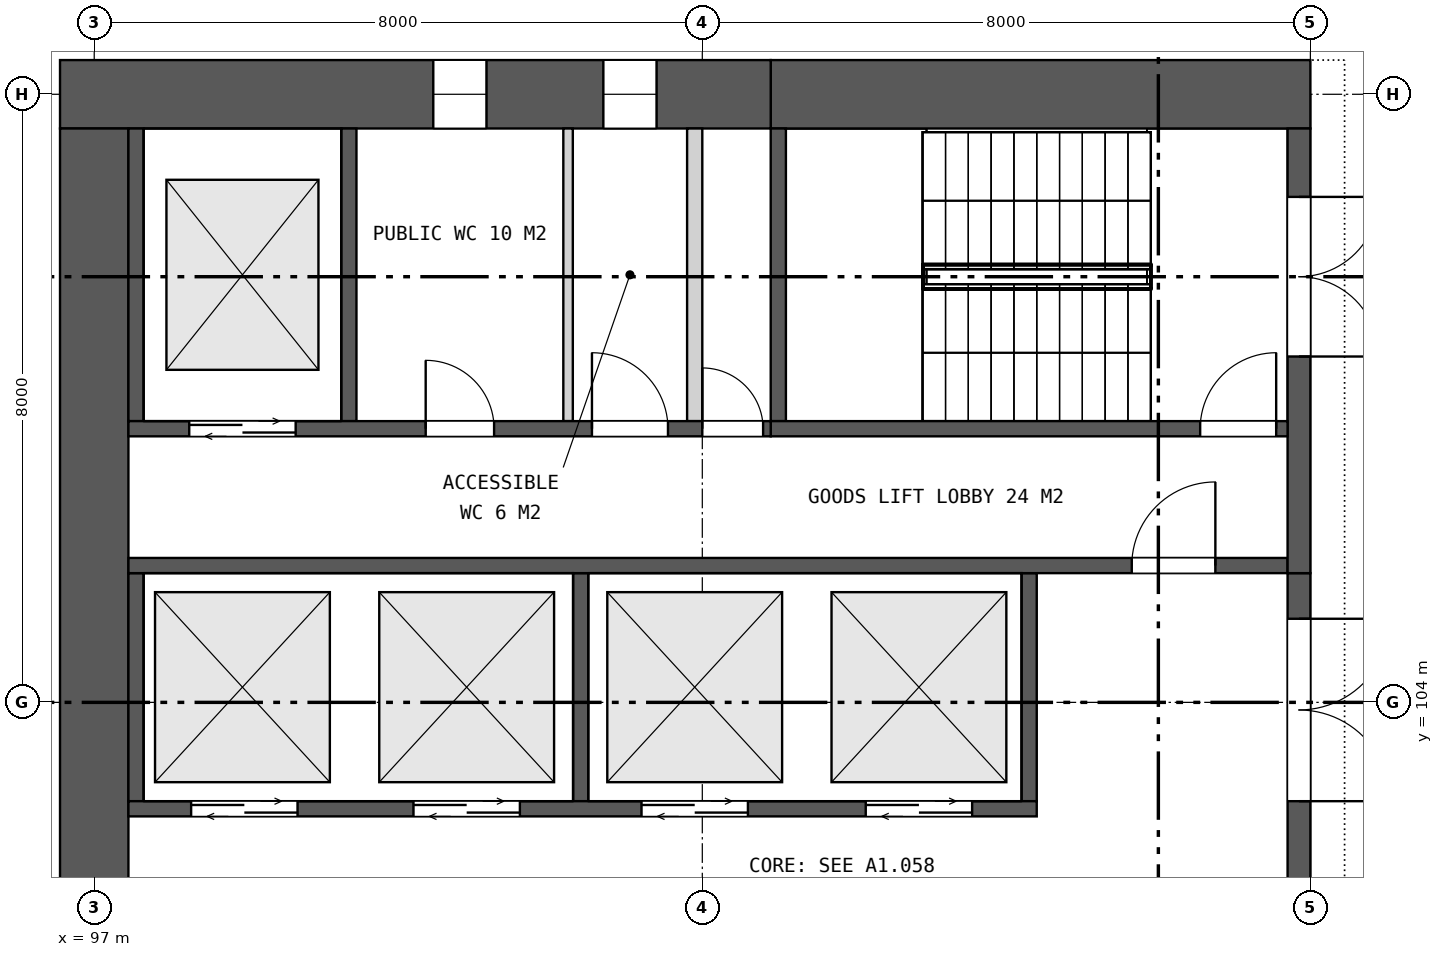
"""IFC4 building model, lengths in metres.
Left out: names, types, materials, properties, quantities, classifications, styles, units other than length and angle.
Written with IfcOpenShell. Run it as: python <this file> out.ifc"""

import sys

from ifc_helpers import new_model, si_unit, direction, frame, frame_2d, origin, place, context, subcontext, project, spatial, rectangle, extrude, element, fill, save


model = new_model("IFC4")
c1 = context("Model", 3, precision=1e-05, world=origin(), true_north=direction((0.0, 1.0)))
c2 = subcontext(c1, "Body", "Model", "MODEL_VIEW")
j1 = project(units=[si_unit("LENGTHUNIT", "METRE"), si_unit("PLANEANGLEUNIT", "RADIAN")], contexts=[c1])
p1 = place(None, origin())
s1 = spatial("IfcSite", under=j1, at=p1, CompositionType="ELEMENT")
p2 = place(p1, origin())
s2 = spatial("IfcBuilding", under=s1, at=p2, CompositionType="ELEMENT")
p3 = place(p2, origin())
s3 = spatial("IfcBuildingStorey", under=s2, at=p3, CompositionType="ELEMENT", Elevation=0.0)
p4 = place(p3, frame((113.0, 112.0, 0.0), z_axis=(0.0, 0.0, 1.0), x_axis=(-1.0, 0.0, 0.0)))
e1 = element("IfcWall", 1, at=p4, inside=s3, PredefinedType="SHEAR", context=c2, shape_type="SweptSolid", body=[
    extrude(rectangle(XDim=7.1, YDim=0.9, at=frame_2d((3.55, 0.0))), origin(), (0.0, 0.0, 1.0), 10.0),
])
p5 = place(p3, frame((105.9, 112.0, 0.0), z_axis=(0.0, 0.0, 1.0), x_axis=(-1.0, 0.0, 0.0)))
e2 = element("IfcWall", 2, at=p5, inside=s3, PredefinedType="SHEAR", context=c2, shape_type="SweptSolid", body=[
    extrude(rectangle(XDim=9.35, YDim=0.9, at=frame_2d((4.675, 0.0))), origin(), (0.0, 0.0, 1.0), 10.0),
])
p6 = place(p5, frame((1.502, 0.0, 1.5)))
e3 = element("IfcOpeningElement", 3, at=p6, cuts=e2, PredefinedType="OPENING", context=c2, shape_type="SweptSolid", body=[
    extrude(rectangle(XDim=0.7, YDim=0.9, at=frame_2d((0.35, 0.45))), frame((0.0, 0.46, 0.0), z_axis=(0.0, -1.0, 0.0), x_axis=(1.0, 0.0, 0.0)), (0.0, 0.0, 1.0), 0.92),
])
p7 = place(p5, frame((3.739, 0.0, 1.5)))
e4 = element("IfcOpeningElement", 4, at=p7, cuts=e2, PredefinedType="OPENING", context=c2, shape_type="SweptSolid", body=[
    extrude(rectangle(XDim=0.7, YDim=0.9, at=frame_2d((0.35, 0.45))), frame((0.0, 0.46, 0.0), z_axis=(0.0, -1.0, 0.0), x_axis=(1.0, 0.0, 0.0)), (0.0, 0.0, 1.0), 0.92),
])
p8 = place(p3, frame((97.0, 111.55, 0.0), z_axis=(0.0, 0.0, 1.0), x_axis=(0.0, -1.0, 0.0)))
e5 = element("IfcWall", 5, at=p8, inside=s3, PredefinedType="SHEAR", context=c2, shape_type="SweptSolid", body=[
    extrude(rectangle(XDim=23.1, YDim=0.9, at=frame_2d((11.55, 0.0))), origin(), (0.0, 0.0, 1.0), 10.0),
])
p9 = place(p8, frame((10.35, 0.0, 0.0)))
e6 = element("IfcOpeningElement", 6, at=p9, cuts=e5, PredefinedType="OPENING", context=c2, shape_type="SweptSolid", body=[
    extrude(rectangle(XDim=2.4, YDim=2.4, at=frame_2d((1.2, 1.2))), frame((0.0, 0.46, 0.0), z_axis=(0.0, -1.0, 0.0), x_axis=(1.0, 0.0, 0.0)), (0.0, 0.0, 1.0), 0.92),
])
p10 = place(p3, frame((112.85, 105.7, 0.0), z_axis=(0.0, 0.0, 1.0), x_axis=(0.0, -1.0, 0.0)))
e7 = element("IfcWall", 7, at=p10, inside=s3, PredefinedType="SHEAR", context=c2, shape_type="SweptSolid", body=[
    extrude(rectangle(XDim=11.4, YDim=0.3, at=frame_2d((5.7, 0.0))), origin(), (0.0, 0.0, 1.0), 10.0),
])
p11 = place(p10, frame((0.6, 0.0, 0.0)))
e8 = element("IfcOpeningElement", 8, at=p11, cuts=e7, PredefinedType="OPENING", context=c2, shape_type="SweptSolid", body=[
    extrude(rectangle(XDim=2.4, YDim=2.4, at=frame_2d((1.2, 1.2))), frame((0.0, 0.16, 0.0), z_axis=(0.0, -1.0, 0.0), x_axis=(1.0, 0.0, 0.0)), (0.0, 0.0, 1.0), 0.32),
])
p12 = place(p10, frame((4.5, 0.0, 0.0)))
e9 = element("IfcOpeningElement", 9, at=p12, cuts=e7, PredefinedType="OPENING", context=c2, shape_type="SweptSolid", body=[
    extrude(rectangle(XDim=2.4, YDim=2.4, at=frame_2d((1.2, 1.2))), frame((0.0, 0.16, 0.0), z_axis=(0.0, -1.0, 0.0), x_axis=(1.0, 0.0, 0.0)), (0.0, 0.0, 1.0), 0.32),
])
p13 = place(p10, frame((8.4, 0.0, 0.0)))
e10 = element("IfcOpeningElement", 10, at=p13, cuts=e7, PredefinedType="OPENING", context=c2, shape_type="SweptSolid", body=[
    extrude(rectangle(XDim=2.4, YDim=2.4, at=frame_2d((1.2, 1.2))), frame((0.0, 0.16, 0.0), z_axis=(0.0, -1.0, 0.0), x_axis=(1.0, 0.0, 0.0)), (0.0, 0.0, 1.0), 0.32),
])
for number, where, z_axis, x_axis in (
    (11, (109.3, 105.7, 0.0), (0.0, 0.0, 1.0), (0.0, -1.0, 0.0)),
    (12, (103.4, 105.7, 0.0), (0.0, 0.0, 1.0), (0.0, -1.0, 0.0)),
    (13, (97.55, 105.7, 0.0), (0.0, 0.0, 1.0), (0.0, -1.0, 0.0)),
):
    element("IfcWall", number, at=place(p3, frame(where, z_axis=z_axis, x_axis=x_axis)), inside=s3, PredefinedType="SHEAR", context=c2, shape_type="SweptSolid", body=[
        extrude(rectangle(XDim=3.0, YDim=0.2, at=frame_2d((1.5, 0.0))), origin(), (0.0, 0.0, 1.0), 10.0),
    ])
p14 = place(p3, frame((109.4, 102.6, 0.0), z_axis=(0.0, 0.0, 1.0), x_axis=(-1.0, 0.0, 0.0)))
e14 = element("IfcWall", 14, at=p14, inside=s3, PredefinedType="SHEAR", context=c2, shape_type="SweptSolid", body=[
    extrude(rectangle(XDim=11.95, YDim=0.2, at=frame_2d((5.975, 0.0))), origin(), (0.0, 0.0, 1.0), 10.0),
])
p15 = place(p14, frame((0.85, 0.0, 0.0)))
e15 = element("IfcOpeningElement", 15, at=p15, cuts=e14, PredefinedType="OPENING", context=c2, shape_type="SweptSolid", body=[
    extrude(rectangle(XDim=1.4, YDim=2.1, at=frame_2d((0.7, 1.05))), frame((0.0, 0.11, 0.0), z_axis=(0.0, -1.0, 0.0), x_axis=(1.0, 0.0, 0.0)), (0.0, 0.0, 1.0), 0.22),
])
p16 = place(p14, frame((3.8, 0.0, 0.0)))
e16 = element("IfcOpeningElement", 16, at=p16, cuts=e14, PredefinedType="OPENING", context=c2, shape_type="SweptSolid", body=[
    extrude(rectangle(XDim=1.4, YDim=2.1, at=frame_2d((0.7, 1.05))), frame((0.0, 0.11, 0.0), z_axis=(0.0, -1.0, 0.0), x_axis=(1.0, 0.0, 0.0)), (0.0, 0.0, 1.0), 0.22),
])
p17 = place(p14, frame((6.8, 0.0, 0.0)))
e17 = element("IfcOpeningElement", 17, at=p17, cuts=e14, PredefinedType="OPENING", context=c2, shape_type="SweptSolid", body=[
    extrude(rectangle(XDim=1.4, YDim=2.1, at=frame_2d((0.7, 1.05))), frame((0.0, 0.11, 0.0), z_axis=(0.0, -1.0, 0.0), x_axis=(1.0, 0.0, 0.0)), (0.0, 0.0, 1.0), 0.22),
])
p18 = place(p14, frame((9.725, 0.0, 0.0)))
e18 = element("IfcOpeningElement", 18, at=p18, cuts=e14, PredefinedType="OPENING", context=c2, shape_type="SweptSolid", body=[
    extrude(rectangle(XDim=1.4, YDim=2.1, at=frame_2d((0.7, 1.05))), frame((0.0, 0.11, 0.0), z_axis=(0.0, -1.0, 0.0), x_axis=(1.0, 0.0, 0.0)), (0.0, 0.0, 1.0), 0.22),
])
p19 = place(p3, frame((112.7, 105.8, 0.0), z_axis=(0.0, 0.0, 1.0), x_axis=(-1.0, 0.0, 0.0)))
e19 = element("IfcWall", 19, at=p19, inside=s3, PredefinedType="SHEAR", context=c2, shape_type="SweptSolid", body=[
    extrude(rectangle(XDim=15.25, YDim=0.2, at=frame_2d((7.625, 0.0))), origin(), (0.0, 0.0, 1.0), 10.0),
])
p20 = place(p19, frame((0.95, 0.0, 0.0)))
e20 = element("IfcOpeningElement", 20, at=p20, cuts=e19, PredefinedType="OPENING", context=c2, shape_type="SweptSolid", body=[
    extrude(rectangle(XDim=1.1, YDim=2.1, at=frame_2d((0.55, 1.05))), frame((0.0, 0.11, 0.0), z_axis=(0.0, -1.0, 0.0), x_axis=(1.0, 0.0, 0.0)), (0.0, 0.0, 1.0), 0.22),
])
p21 = place(p3, frame((112.85, 111.55, 0.0), z_axis=(0.0, 0.0, 1.0), x_axis=(0.0, -1.0, 0.0)))
e21 = element("IfcWall", 21, at=p21, inside=s3, PredefinedType="SHEAR", context=c2, shape_type="SweptSolid", body=[
    extrude(rectangle(XDim=5.85, YDim=0.3, at=frame_2d((2.925, 0.0))), origin(), (0.0, 0.0, 1.0), 10.0),
])
p22 = place(p21, frame((0.9, 0.0, 0.0)))
e22 = element("IfcOpeningElement", 22, at=p22, cuts=e21, PredefinedType="OPENING", context=c2, shape_type="SweptSolid", body=[
    extrude(rectangle(XDim=2.1, YDim=2.4, at=frame_2d((1.05, 1.2))), frame((0.0, 0.16, 0.0), z_axis=(0.0, -1.0, 0.0), x_axis=(1.0, 0.0, 0.0)), (0.0, 0.0, 1.0), 0.32),
])
for number, where, z_axis, x_axis in (
    (23, (106.0, 111.55, 0.0), (0.0, 0.0, 1.0), (0.0, -1.0, 0.0)),
    (24, (100.35, 111.55, 0.0), (0.0, 0.0, 1.0), (0.0, -1.0, 0.0)),
    (25, (97.55, 111.55, 0.0), (0.0, 0.0, 1.0), (0.0, -1.0, 0.0)),
):
    element("IfcWall", number, at=place(p3, frame(where, z_axis=z_axis, x_axis=x_axis)), inside=s3, PredefinedType="SHEAR", context=c2, shape_type="SweptSolid", body=[
        extrude(rectangle(XDim=3.85, YDim=0.2, at=frame_2d((1.925, 0.0))), origin(), (0.0, 0.0, 1.0), 10.0),
    ])
p23 = place(p3, frame((104.9, 111.55, 0.0), z_axis=(0.0, 0.0, 1.0), x_axis=(0.0, -1.0, 0.0)))
e26 = element("IfcWall", 26, at=p23, inside=s3, PredefinedType="PARTITIONING", context=c2, shape_type="SweptSolid", body=[
    extrude(rectangle(XDim=3.85, YDim=0.2, at=frame_2d((1.925, 0.0))), origin(), (0.0, 0.0, 1.0), 10.0),
])
p24 = place(p3, frame((103.234, 111.55, 0.0), z_axis=(0.0, 0.0, 1.0), x_axis=(0.0, -1.0, 0.0)))
e27 = element("IfcWall", 27, at=p24, inside=s3, PredefinedType="PARTITIONING", context=c2, shape_type="SweptSolid", body=[
    extrude(rectangle(XDim=3.85, YDim=0.125, at=frame_2d((1.925, 0.0))), origin(), (0.0, 0.0, 1.0), 10.0),
])
p25 = place(p3, frame((112.7, 107.6, 0.0), z_axis=(0.0, 0.0, 1.0), x_axis=(-1.0, 0.0, 0.0)))
e28 = element("IfcWall", 28, at=p25, inside=s3, PredefinedType="SHEAR", context=c2, shape_type="SweptSolid", body=[
    extrude(rectangle(XDim=6.8, YDim=0.2, at=frame_2d((3.4, 0.0))), origin(), (0.0, 0.0, 1.0), 10.0),
])
p26 = place(p25, frame((0.15, 0.0, 0.0)))
e29 = element("IfcOpeningElement", 29, at=p26, cuts=e28, PredefinedType="OPENING", context=c2, shape_type="SweptSolid", body=[
    extrude(rectangle(XDim=1.0, YDim=2.1, at=frame_2d((0.5, 1.05))), frame((0.0, 0.11, 0.0), z_axis=(0.0, -1.0, 0.0), x_axis=(1.0, 0.0, 0.0)), (0.0, 0.0, 1.0), 0.22),
])
p27 = place(p3, frame((105.9, 107.6, 0.0), z_axis=(0.0, 0.0, 1.0), x_axis=(-1.0, 0.0, 0.0)))
e30 = element("IfcWall", 30, at=p27, inside=s3, PredefinedType="SHEAR", context=c2, shape_type="SweptSolid", body=[
    extrude(rectangle(XDim=8.45, YDim=0.2, at=frame_2d((4.225, 0.0))), origin(), (0.0, 0.0, 1.0), 10.0),
])
p28 = place(p27, frame((0.1, 0.0, 0.0)))
e31 = element("IfcOpeningElement", 31, at=p28, cuts=e30, PredefinedType="OPENING", context=c2, shape_type="SweptSolid", body=[
    extrude(rectangle(XDim=0.8, YDim=2.1, at=frame_2d((0.4, 1.05))), frame((0.0, 0.11, 0.0), z_axis=(0.0, -1.0, 0.0), x_axis=(1.0, 0.0, 0.0)), (0.0, 0.0, 1.0), 0.22),
])
p29 = place(p27, frame((1.352, 0.0, 0.0)))
e32 = element("IfcOpeningElement", 32, at=p29, cuts=e30, PredefinedType="OPENING", context=c2, shape_type="SweptSolid", body=[
    extrude(rectangle(XDim=1.0, YDim=2.1, at=frame_2d((0.5, 1.05))), frame((0.0, 0.11, 0.0), z_axis=(0.0, -1.0, 0.0), x_axis=(1.0, 0.0, 0.0)), (0.0, 0.0, 1.0), 0.22),
])
p30 = place(p27, frame((3.639, 0.0, 0.0)))
e33 = element("IfcOpeningElement", 33, at=p30, cuts=e30, PredefinedType="OPENING", context=c2, shape_type="SweptSolid", body=[
    extrude(rectangle(XDim=0.9, YDim=2.1, at=frame_2d((0.45, 1.05))), frame((0.0, 0.11, 0.0), z_axis=(0.0, -1.0, 0.0), x_axis=(1.0, 0.0, 0.0)), (0.0, 0.0, 1.0), 0.22),
])
p31 = place(p27, frame((6.25, 0.0, 0.0)))
e34 = element("IfcOpeningElement", 34, at=p31, cuts=e30, PredefinedType="OPENING", context=c2, shape_type="SweptSolid", body=[
    extrude(rectangle(XDim=1.4, YDim=2.1, at=frame_2d((0.7, 1.05))), frame((0.0, 0.11, 0.0), z_axis=(0.0, -1.0, 0.0), x_axis=(1.0, 0.0, 0.0)), (0.0, 0.0, 1.0), 0.22),
])
p32 = place(p6, origin())
e35 = element("IfcWindow", 35, at=p32, inside=s3, PartitioningType="SINGLE_PANEL", PredefinedType="WINDOW", context=c2, shape_type="SweptSolid", body=[
    extrude(rectangle(XDim=0.7, YDim=0.9, at=frame_2d((0.35, 0.45))), frame((0.0, 0.03, 0.0), z_axis=(0.0, -1.0, 0.0), x_axis=(1.0, 0.0, 0.0)), (0.0, 0.0, 1.0), 0.06),
])
fill(e3, e35)
p33 = place(p7, origin())
e36 = element("IfcWindow", 36, at=p33, inside=s3, PartitioningType="SINGLE_PANEL", PredefinedType="WINDOW", context=c2, shape_type="SweptSolid", body=[
    extrude(rectangle(XDim=0.7, YDim=0.9, at=frame_2d((0.35, 0.45))), frame((0.0, 0.03, 0.0), z_axis=(0.0, -1.0, 0.0), x_axis=(1.0, 0.0, 0.0)), (0.0, 0.0, 1.0), 0.06),
])
fill(e4, e36)
p34 = place(p11, origin())
e37 = element("IfcDoor", 37, at=p34, inside=s3, OperationType="DOUBLE_DOOR_SINGLE_SWING", PredefinedType="DOOR", context=c2, shape_type="SweptSolid", body=[
    extrude(rectangle(XDim=2.4, YDim=2.4, at=frame_2d((1.2, 1.2))), frame((0.0, 0.025, 0.0), z_axis=(0.0, -1.0, 0.0), x_axis=(1.0, 0.0, 0.0)), (0.0, 0.0, 1.0), 0.05),
])
fill(e8, e37)
p35 = place(p15, origin())
e38 = element("IfcDoor", 38, at=p35, inside=s3, OperationType="DOUBLE_DOOR_SLIDING", PredefinedType="DOOR", context=c2, shape_type="SweptSolid", body=[
    extrude(rectangle(XDim=1.4, YDim=2.1, at=frame_2d((0.7, 1.05))), frame((0.0, 0.025, 0.0), z_axis=(0.0, -1.0, 0.0), x_axis=(1.0, 0.0, 0.0)), (0.0, 0.0, 1.0), 0.05),
])
fill(e15, e38)
p36 = place(p16, origin())
e39 = element("IfcDoor", 39, at=p36, inside=s3, OperationType="DOUBLE_DOOR_SLIDING", PredefinedType="DOOR", context=c2, shape_type="SweptSolid", body=[
    extrude(rectangle(XDim=1.4, YDim=2.1, at=frame_2d((0.7, 1.05))), frame((0.0, 0.025, 0.0), z_axis=(0.0, -1.0, 0.0), x_axis=(1.0, 0.0, 0.0)), (0.0, 0.0, 1.0), 0.05),
])
fill(e16, e39)
p37 = place(p17, origin())
e40 = element("IfcDoor", 40, at=p37, inside=s3, OperationType="DOUBLE_DOOR_SLIDING", PredefinedType="DOOR", context=c2, shape_type="SweptSolid", body=[
    extrude(rectangle(XDim=1.4, YDim=2.1, at=frame_2d((0.7, 1.05))), frame((0.0, 0.025, 0.0), z_axis=(0.0, -1.0, 0.0), x_axis=(1.0, 0.0, 0.0)), (0.0, 0.0, 1.0), 0.05),
])
fill(e17, e40)
p38 = place(p18, origin())
e41 = element("IfcDoor", 41, at=p38, inside=s3, OperationType="DOUBLE_DOOR_SLIDING", PredefinedType="DOOR", context=c2, shape_type="SweptSolid", body=[
    extrude(rectangle(XDim=1.4, YDim=2.1, at=frame_2d((0.7, 1.05))), frame((0.0, 0.025, 0.0), z_axis=(0.0, -1.0, 0.0), x_axis=(1.0, 0.0, 0.0)), (0.0, 0.0, 1.0), 0.05),
])
fill(e18, e41)
p39 = place(p20, frame((1.1, 0.0, 0.0), z_axis=(0.0, 0.0, 1.0), x_axis=(-1.0, 0.0, 0.0)))
e42 = element("IfcDoor", 42, at=p39, inside=s3, OperationType="SINGLE_SWING_RIGHT", PredefinedType="DOOR", context=c2, shape_type="SweptSolid", body=[
    extrude(rectangle(XDim=1.1, YDim=2.1, at=frame_2d((0.55, 1.05))), frame((0.0, 0.025, 0.0), z_axis=(0.0, -1.0, 0.0), x_axis=(1.0, 0.0, 0.0)), (0.0, 0.0, 1.0), 0.05),
])
fill(e20, e42)
p40 = place(p22, origin())
e43 = element("IfcDoor", 43, at=p40, inside=s3, OperationType="DOUBLE_DOOR_SINGLE_SWING", PredefinedType="DOOR", context=c2, shape_type="SweptSolid", body=[
    extrude(rectangle(XDim=2.1, YDim=2.4, at=frame_2d((1.05, 1.2))), frame((0.0, 0.025, 0.0), z_axis=(0.0, -1.0, 0.0), x_axis=(1.0, 0.0, 0.0)), (0.0, 0.0, 1.0), 0.05),
])
fill(e22, e43)
p41 = place(p26, frame((1.0, 0.0, 0.0), z_axis=(0.0, 0.0, 1.0), x_axis=(-1.0, 0.0, 0.0)))
e44 = element("IfcDoor", 44, at=p41, inside=s3, OperationType="SINGLE_SWING_RIGHT", PredefinedType="DOOR", context=c2, shape_type="SweptSolid", body=[
    extrude(rectangle(XDim=1.0, YDim=2.1, at=frame_2d((0.5, 1.05))), frame((0.0, 0.025, 0.0), z_axis=(0.0, -1.0, 0.0), x_axis=(1.0, 0.0, 0.0)), (0.0, 0.0, 1.0), 0.05),
])
fill(e29, e44)
p42 = place(p28, frame((0.8, 0.0, 0.0), z_axis=(0.0, 0.0, 1.0), x_axis=(-1.0, 0.0, 0.0)))
e45 = element("IfcDoor", 45, at=p42, inside=s3, OperationType="SINGLE_SWING_LEFT", PredefinedType="DOOR", context=c2, shape_type="SweptSolid", body=[
    extrude(rectangle(XDim=0.8, YDim=2.1, at=frame_2d((0.4, 1.05))), frame((0.0, 0.025, 0.0), z_axis=(0.0, -1.0, 0.0), x_axis=(1.0, 0.0, 0.0)), (0.0, 0.0, 1.0), 0.05),
])
fill(e31, e45)
p43 = place(p29, frame((1.0, 0.0, 0.0), z_axis=(0.0, 0.0, 1.0), x_axis=(-1.0, 0.0, 0.0)))
e46 = element("IfcDoor", 46, at=p43, inside=s3, OperationType="SINGLE_SWING_LEFT", PredefinedType="DOOR", context=c2, shape_type="SweptSolid", body=[
    extrude(rectangle(XDim=1.0, YDim=2.1, at=frame_2d((0.5, 1.05))), frame((0.0, 0.025, 0.0), z_axis=(0.0, -1.0, 0.0), x_axis=(1.0, 0.0, 0.0)), (0.0, 0.0, 1.0), 0.05),
])
fill(e32, e46)
p44 = place(p30, frame((0.9, 0.0, 0.0), z_axis=(0.0, 0.0, 1.0), x_axis=(-1.0, 0.0, 0.0)))
e47 = element("IfcDoor", 47, at=p44, inside=s3, OperationType="SINGLE_SWING_LEFT", PredefinedType="DOOR", context=c2, shape_type="SweptSolid", body=[
    extrude(rectangle(XDim=0.9, YDim=2.1, at=frame_2d((0.45, 1.05))), frame((0.0, 0.025, 0.0), z_axis=(0.0, -1.0, 0.0), x_axis=(1.0, 0.0, 0.0)), (0.0, 0.0, 1.0), 0.05),
])
fill(e33, e47)
p45 = place(p31, origin())
e48 = element("IfcDoor", 48, at=p45, inside=s3, OperationType="DOUBLE_DOOR_SLIDING", PredefinedType="DOOR", context=c2, shape_type="SweptSolid", body=[
    extrude(rectangle(XDim=1.4, YDim=2.1, at=frame_2d((0.7, 1.05))), frame((0.0, 0.025, 0.0), z_axis=(0.0, -1.0, 0.0), x_axis=(1.0, 0.0, 0.0)), (0.0, 0.0, 1.0), 0.05),
])
fill(e34, e48)
save(model, sys.argv[1])
